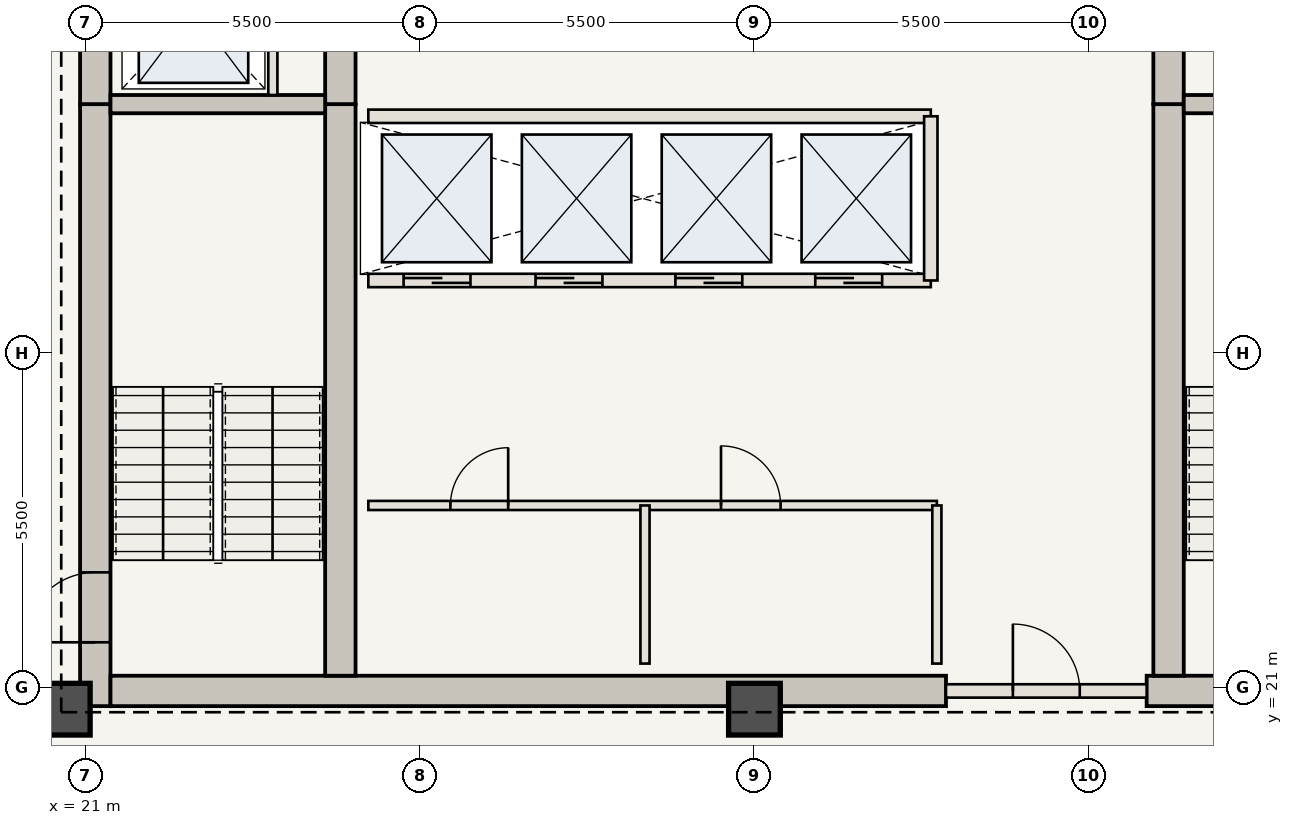
"""IFC4 building model, lengths in metres.
Left out: names, types, materials, properties, quantities, classifications, styles, units other than length and angle.
Written with IfcOpenShell. Run it as: python <this file> out.ifc"""

import sys

from ifc_helpers import new_model, si_unit, direction, frame, frame_2d, origin, origin_2d, place, context, subcontext, project, spatial, rectangle, extrude, element, fill, save


model = new_model("IFC4")
c1 = context("Model", 3, precision=1e-05, world=origin(), true_north=direction((0.0, 1.0)))
c2 = subcontext(c1, "Body", "Model", "MODEL_VIEW")
j1 = project(units=[si_unit("LENGTHUNIT", "METRE"), si_unit("PLANEANGLEUNIT", "RADIAN")], contexts=[c1])
p1 = place(None, origin())
s1 = spatial("IfcSite", under=j1, at=p1, CompositionType="ELEMENT")
p2 = place(p1, origin())
s2 = spatial("IfcBuilding", under=s1, at=p2, CompositionType="ELEMENT")
p3 = place(p2, frame((0.0, 0.0, 233.1)))
s3 = spatial("IfcBuildingStorey", under=s2, at=p3, CompositionType="ELEMENT", Elevation=233.1)
p4 = place(p3, frame((21.16, 20.7, 0.0), z_axis=(0.0, 0.0, 1.0), x_axis=(0.0, 1.0, 0.0)))
e1 = element("IfcWall", 1, at=p4, inside=s3, PredefinedType="SHEAR", context=c2, shape_type="SweptSolid", body=[
    extrude(rectangle(XDim=9.9, YDim=0.5, at=frame_2d((4.95, 0.0))), origin(), (0.0, 0.0, 1.0), 3.85),
])
p5 = place(p4, frame((1.05, 0.0, 0.0)))
e2 = element("IfcOpeningElement", 2, at=p5, cuts=e1, PredefinedType="OPENING", context=c2, shape_type="SweptSolid", body=[
    extrude(rectangle(XDim=1.15, YDim=2.15, at=frame_2d((0.575, 1.075))), frame((0.0, 0.26, 0.0), z_axis=(0.0, -1.0, 0.0), x_axis=(1.0, 0.0, 0.0)), (0.0, 0.0, 1.0), 0.52),
])
p6 = place(p3, frame((21.16, 30.6, 0.0), z_axis=(0.0, 0.0, 1.0), x_axis=(0.0, 1.0, 0.0)))
e3 = element("IfcWall", 3, at=p6, inside=s3, PredefinedType="SHEAR", context=c2, shape_type="SweptSolid", body=[
    extrude(rectangle(XDim=12.65, YDim=0.5, at=frame_2d((6.325, 0.0))), origin(), (0.0, 0.0, 1.0), 3.85),
])
p7 = place(p6, frame((4.2, 0.0, 0.0)))
e4 = element("IfcOpeningElement", 4, at=p7, cuts=e3, PredefinedType="OPENING", context=c2, shape_type="SweptSolid", body=[
    extrude(rectangle(XDim=1.1, YDim=2.15, at=frame_2d((0.55, 1.075))), frame((0.0, 0.26, 0.0), z_axis=(0.0, -1.0, 0.0), x_axis=(1.0, 0.0, 0.0)), (0.0, 0.0, 1.0), 0.52),
])
p8 = place(p6, frame((9.2, 0.0, 0.0)))
e5 = element("IfcOpeningElement", 5, at=p8, cuts=e3, PredefinedType="OPENING", context=c2, shape_type="SweptSolid", body=[
    extrude(rectangle(XDim=0.92, YDim=2.1, at=frame_2d((0.46, 1.05))), frame((0.0, 0.26, 0.0), z_axis=(0.0, -1.0, 0.0), x_axis=(1.0, 0.0, 0.0)), (0.0, 0.0, 1.0), 0.52),
])
p9 = place(p3, frame((21.41, 20.95, 0.0), z_axis=(0.0, 0.0, 1.0), x_axis=(1.0, 0.0, 0.0)))
e6 = element("IfcWall", 6, at=p9, inside=s3, PredefinedType="SHEAR", context=c2, shape_type="SweptSolid", body=[
    extrude(rectangle(XDim=13.74, YDim=0.5, at=frame_2d((6.87, 0.0))), origin(), (0.0, 0.0, 1.0), 3.85),
])
p10 = place(p3, frame((38.45, 20.95, 0.0), z_axis=(0.0, 0.0, 1.0), x_axis=(1.0, 0.0, 0.0)))
e7 = element("IfcWall", 7, at=p10, inside=s3, PredefinedType="SHEAR", context=c2, shape_type="SweptSolid", body=[
    extrude(rectangle(XDim=4.14, YDim=0.5, at=frame_2d((2.07, 0.0))), origin(), (0.0, 0.0, 1.0), 3.85),
])
p11 = place(p3, frame((25.19, 21.2, 0.0), z_axis=(0.0, 0.0, 1.0), x_axis=(0.0, 1.0, 0.0)))
e8 = element("IfcWall", 8, at=p11, inside=s3, PredefinedType="SHEAR", context=c2, shape_type="SweptSolid", body=[
    extrude(rectangle(XDim=9.4, YDim=0.5, at=frame_2d((4.7, 0.0))), origin(), (0.0, 0.0, 1.0), 3.85),
])
p12 = place(p3, frame((25.19, 30.6, 0.0), z_axis=(0.0, 0.0, 1.0), x_axis=(0.0, 1.0, 0.0)))
e9 = element("IfcWall", 9, at=p12, inside=s3, PredefinedType="SHEAR", context=c2, shape_type="SweptSolid", body=[
    extrude(rectangle(XDim=12.15, YDim=0.5, at=frame_2d((6.075, 0.0))), origin(), (0.0, 0.0, 1.0), 3.85),
])
p13 = place(p12, frame((6.25, 0.0, 0.0)))
e10 = element("IfcOpeningElement", 10, at=p13, cuts=e9, PredefinedType="OPENING", context=c2, shape_type="SweptSolid", body=[
    extrude(rectangle(XDim=1.1, YDim=2.15, at=frame_2d((0.55, 1.075))), frame((0.0, 0.26, 0.0), z_axis=(0.0, -1.0, 0.0), x_axis=(1.0, 0.0, 0.0)), (0.0, 0.0, 1.0), 0.52),
])
p14 = place(p3, frame((38.81, 21.2, 0.0), z_axis=(0.0, 0.0, 1.0), x_axis=(0.0, 1.0, 0.0)))
e11 = element("IfcWall", 11, at=p14, inside=s3, PredefinedType="SHEAR", context=c2, shape_type="SweptSolid", body=[
    extrude(rectangle(XDim=9.4, YDim=0.5, at=frame_2d((4.7, 0.0))), origin(), (0.0, 0.0, 1.0), 3.85),
])
p15 = place(p3, frame((38.81, 30.6, 0.0), z_axis=(0.0, 0.0, 1.0), x_axis=(0.0, 1.0, 0.0)))
e12 = element("IfcWall", 12, at=p15, inside=s3, PredefinedType="SHEAR", context=c2, shape_type="SweptSolid", body=[
    extrude(rectangle(XDim=12.15, YDim=0.5, at=frame_2d((6.075, 0.0))), origin(), (0.0, 0.0, 1.0), 3.85),
])
for number, where, z_axis, x_axis in (
    (13, (20.65, 20.65, 0.0), (0.0, 0.0, 1.0), (1.0, 0.0, 0.0)),
    (14, (32.0, 20.65, 0.0), (0.0, 0.0, 1.0), (1.0, 0.0, 0.0)),
):
    element("IfcColumn", number, at=place(p3, frame(where, z_axis=z_axis, x_axis=x_axis)), inside=s3, PredefinedType="COLUMN", context=c2, shape_type="SweptSolid", body=[
        extrude(rectangle(XDim=0.85, YDim=0.85, at=origin_2d()), origin(), (0.0, 0.0, 1.0), 3.85),
    ])
for number, where, z_axis, x_axis in (
    (15, (21.41, 30.6, 0.0), (0.0, 0.0, 1.0), (1.0, 0.0, 0.0)),
    (16, (39.06, 30.6, 0.0), (0.0, 0.0, 1.0), (1.0, 0.0, 0.0)),
):
    element("IfcWall", number, at=place(p3, frame(where, z_axis=z_axis, x_axis=x_axis)), inside=s3, PredefinedType="SHEAR", context=c2, shape_type="SweptSolid", body=[
        extrude(rectangle(XDim=3.53, YDim=0.3, at=frame_2d((1.765, 0.0))), origin(), (0.0, 0.0, 1.0), 3.685),
    ])
p16 = place(p3, frame((24.08, 30.75, 0.0), z_axis=(0.0, 0.0, 1.0), x_axis=(0.0, 1.0, 0.0)))
e17 = element("IfcWall", 17, at=p16, inside=s3, PredefinedType="STANDARD", context=c2, shape_type="SweptSolid", body=[
    extrude(rectangle(XDim=2.65, YDim=0.15, at=frame_2d((1.325, 0.0))), origin(), (0.0, 0.0, 1.0), 3.685),
])
p17 = place(p3, frame((35.15, 20.95, 0.0), z_axis=(0.0, 0.0, 1.0), x_axis=(1.0, 0.0, 0.0)))
e18 = element("IfcWall", 18, at=p17, inside=s3, PredefinedType="STANDARD", context=c2, shape_type="SweptSolid", body=[
    extrude(rectangle(XDim=3.3, YDim=0.22, at=frame_2d((1.65, 0.0))), origin(), (0.0, 0.0, 1.0), 3.685),
])
p18 = place(p17, frame((1.1, 0.0, 0.0)))
e19 = element("IfcOpeningElement", 19, at=p18, cuts=e18, PredefinedType="OPENING", context=c2, shape_type="SweptSolid", body=[
    extrude(rectangle(XDim=1.1, YDim=2.15, at=frame_2d((0.55, 1.075))), frame((0.0, 0.12, 0.0), z_axis=(0.0, -1.0, 0.0), x_axis=(1.0, 0.0, 0.0)), (0.0, 0.0, 1.0), 0.24),
])
p19 = place(p3, frame((25.65, 24.0, 0.0), z_axis=(0.0, 0.0, 1.0), x_axis=(1.0, 0.0, 0.0)))
e20 = element("IfcWall", 20, at=p19, inside=s3, PredefinedType="STANDARD", context=c2, shape_type="SweptSolid", body=[
    extrude(rectangle(XDim=9.35, YDim=0.15, at=frame_2d((4.675, 0.0))), origin(), (0.0, 0.0, 1.0), 3.685),
])
p20 = place(p19, frame((1.35, 0.0, 0.0)))
e21 = element("IfcOpeningElement", 21, at=p20, cuts=e20, PredefinedType="OPENING", context=c2, shape_type="SweptSolid", body=[
    extrude(rectangle(XDim=0.95, YDim=2.15, at=frame_2d((0.475, 1.075))), frame((0.0, 0.085, 0.0), z_axis=(0.0, -1.0, 0.0), x_axis=(1.0, 0.0, 0.0)), (0.0, 0.0, 1.0), 0.17),
])
p21 = place(p19, frame((5.8, 0.0, 0.0)))
e22 = element("IfcOpeningElement", 22, at=p21, cuts=e20, PredefinedType="OPENING", context=c2, shape_type="SweptSolid", body=[
    extrude(rectangle(XDim=0.98, YDim=2.2, at=frame_2d((0.49, 1.1))), frame((0.0, 0.085, 0.0), z_axis=(0.0, -1.0, 0.0), x_axis=(1.0, 0.0, 0.0)), (0.0, 0.0, 1.0), 0.17),
])
for number, where, z_axis, x_axis in (
    (23, (30.2, 21.4, 0.0), (0.0, 0.0, 1.0), (0.0, 1.0, 0.0)),
    (24, (35.0, 21.4, 0.0), (0.0, 0.0, 1.0), (0.0, 1.0, 0.0)),
):
    element("IfcWall", number, at=place(p3, frame(where, z_axis=z_axis, x_axis=x_axis)), inside=s3, PredefinedType="STANDARD", context=c2, shape_type="SweptSolid", body=[
        extrude(rectangle(XDim=2.6, YDim=0.15, at=frame_2d((1.3, 0.0))), origin(), (0.0, 0.0, 1.0), 3.685),
    ])
p22 = place(p3, frame((25.65, 27.7, 0.0), z_axis=(0.0, 0.0, 1.0), x_axis=(1.0, 0.0, 0.0)))
e25 = element("IfcWall", 25, at=p22, inside=s3, PredefinedType="STANDARD", context=c2, shape_type="SweptSolid", body=[
    extrude(rectangle(XDim=9.25, YDim=0.22, at=frame_2d((4.625, 0.0))), origin(), (0.0, 0.0, 1.0), 3.685),
])
p23 = place(p22, frame((0.58, 0.0, 0.0)))
e26 = element("IfcOpeningElement", 26, at=p23, cuts=e25, PredefinedType="OPENING", context=c2, shape_type="SweptSolid", body=[
    extrude(rectangle(XDim=1.1, YDim=2.15, at=frame_2d((0.55, 1.075))), frame((0.0, 0.12, 0.0), z_axis=(0.0, -1.0, 0.0), x_axis=(1.0, 0.0, 0.0)), (0.0, 0.0, 1.0), 0.24),
])
p24 = place(p22, frame((2.75, 0.0, 0.0)))
e27 = element("IfcOpeningElement", 27, at=p24, cuts=e25, PredefinedType="OPENING", context=c2, shape_type="SweptSolid", body=[
    extrude(rectangle(XDim=1.1, YDim=2.15, at=frame_2d((0.55, 1.075))), frame((0.0, 0.12, 0.0), z_axis=(0.0, -1.0, 0.0), x_axis=(1.0, 0.0, 0.0)), (0.0, 0.0, 1.0), 0.24),
])
p25 = place(p22, frame((5.05, 0.0, 0.0)))
e28 = element("IfcOpeningElement", 28, at=p25, cuts=e25, PredefinedType="OPENING", context=c2, shape_type="SweptSolid", body=[
    extrude(rectangle(XDim=1.1, YDim=2.15, at=frame_2d((0.55, 1.075))), frame((0.0, 0.12, 0.0), z_axis=(0.0, -1.0, 0.0), x_axis=(1.0, 0.0, 0.0)), (0.0, 0.0, 1.0), 0.24),
])
p26 = place(p22, frame((7.35, 0.0, 0.0)))
e29 = element("IfcOpeningElement", 29, at=p26, cuts=e25, PredefinedType="OPENING", context=c2, shape_type="SweptSolid", body=[
    extrude(rectangle(XDim=1.1, YDim=2.15, at=frame_2d((0.55, 1.075))), frame((0.0, 0.12, 0.0), z_axis=(0.0, -1.0, 0.0), x_axis=(1.0, 0.0, 0.0)), (0.0, 0.0, 1.0), 0.24),
])
p27 = place(p3, frame((25.65, 30.4, 0.0), z_axis=(0.0, 0.0, 1.0), x_axis=(1.0, 0.0, 0.0)))
e30 = element("IfcWall", 30, at=p27, inside=s3, PredefinedType="STANDARD", context=c2, shape_type="SweptSolid", body=[
    extrude(rectangle(XDim=9.25, YDim=0.22, at=frame_2d((4.625, 0.0))), origin(), (0.0, 0.0, 1.0), 3.685),
])
p28 = place(p3, frame((34.9, 27.7, 0.0), z_axis=(0.0, 0.0, 1.0), x_axis=(0.0, 1.0, 0.0)))
e31 = element("IfcWall", 31, at=p28, inside=s3, PredefinedType="STANDARD", context=c2, shape_type="SweptSolid", body=[
    extrude(rectangle(XDim=2.7, YDim=0.22, at=frame_2d((1.35, 0.0))), origin(), (0.0, 0.0, 1.0), 3.685),
])
p29 = place(p5, origin())
e32 = element("IfcDoor", 32, at=p29, inside=s3, OperationType="SINGLE_SWING_LEFT", PredefinedType="DOOR", context=c2, shape_type="SweptSolid", body=[
    extrude(rectangle(XDim=1.15, YDim=2.15, at=frame_2d((0.575, 1.075))), frame((0.0, 0.025, 0.0), z_axis=(0.0, -1.0, 0.0), x_axis=(1.0, 0.0, 0.0)), (0.0, 0.0, 1.0), 0.05),
])
fill(e2, e32)
p30 = place(p18, origin())
e33 = element("IfcDoor", 33, at=p30, inside=s3, OperationType="SINGLE_SWING_LEFT", PredefinedType="DOOR", context=c2, shape_type="SweptSolid", body=[
    extrude(rectangle(XDim=1.1, YDim=2.15, at=frame_2d((0.55, 1.075))), frame((0.0, 0.025, 0.0), z_axis=(0.0, -1.0, 0.0), x_axis=(1.0, 0.0, 0.0)), (0.0, 0.0, 1.0), 0.05),
])
fill(e19, e33)
p31 = place(p20, origin())
e34 = element("IfcDoor", 34, at=p31, inside=s3, OperationType="SINGLE_SWING_RIGHT", PredefinedType="DOOR", context=c2, shape_type="SweptSolid", body=[
    extrude(rectangle(XDim=0.95, YDim=2.15, at=frame_2d((0.475, 1.075))), frame((0.0, 0.025, 0.0), z_axis=(0.0, -1.0, 0.0), x_axis=(1.0, 0.0, 0.0)), (0.0, 0.0, 1.0), 0.05),
])
fill(e21, e34)
p32 = place(p21, origin())
e35 = element("IfcDoor", 35, at=p32, inside=s3, OperationType="SINGLE_SWING_LEFT", PredefinedType="DOOR", context=c2, shape_type="SweptSolid", body=[
    extrude(rectangle(XDim=0.98, YDim=2.2, at=frame_2d((0.49, 1.1))), frame((0.0, 0.025, 0.0), z_axis=(0.0, -1.0, 0.0), x_axis=(1.0, 0.0, 0.0)), (0.0, 0.0, 1.0), 0.05),
])
fill(e22, e35)
p33 = place(p23, origin())
e36 = element("IfcDoor", 36, at=p33, inside=s3, OperationType="DOUBLE_DOOR_SLIDING", PredefinedType="DOOR", context=c2, shape_type="SweptSolid", body=[
    extrude(rectangle(XDim=1.1, YDim=2.15, at=frame_2d((0.55, 1.075))), frame((0.0, 0.025, 0.0), z_axis=(0.0, -1.0, 0.0), x_axis=(1.0, 0.0, 0.0)), (0.0, 0.0, 1.0), 0.05),
])
fill(e26, e36)
p34 = place(p24, origin())
e37 = element("IfcDoor", 37, at=p34, inside=s3, OperationType="DOUBLE_DOOR_SLIDING", PredefinedType="DOOR", context=c2, shape_type="SweptSolid", body=[
    extrude(rectangle(XDim=1.1, YDim=2.15, at=frame_2d((0.55, 1.075))), frame((0.0, 0.025, 0.0), z_axis=(0.0, -1.0, 0.0), x_axis=(1.0, 0.0, 0.0)), (0.0, 0.0, 1.0), 0.05),
])
fill(e27, e37)
p35 = place(p25, origin())
e38 = element("IfcDoor", 38, at=p35, inside=s3, OperationType="DOUBLE_DOOR_SLIDING", PredefinedType="DOOR", context=c2, shape_type="SweptSolid", body=[
    extrude(rectangle(XDim=1.1, YDim=2.15, at=frame_2d((0.55, 1.075))), frame((0.0, 0.025, 0.0), z_axis=(0.0, -1.0, 0.0), x_axis=(1.0, 0.0, 0.0)), (0.0, 0.0, 1.0), 0.05),
])
fill(e28, e38)
p36 = place(p26, origin())
e39 = element("IfcDoor", 39, at=p36, inside=s3, OperationType="DOUBLE_DOOR_SLIDING", PredefinedType="DOOR", context=c2, shape_type="SweptSolid", body=[
    extrude(rectangle(XDim=1.1, YDim=2.15, at=frame_2d((0.55, 1.075))), frame((0.0, 0.025, 0.0), z_axis=(0.0, -1.0, 0.0), x_axis=(1.0, 0.0, 0.0)), (0.0, 0.0, 1.0), 0.05),
])
fill(e29, e39)
save(model, sys.argv[1])
